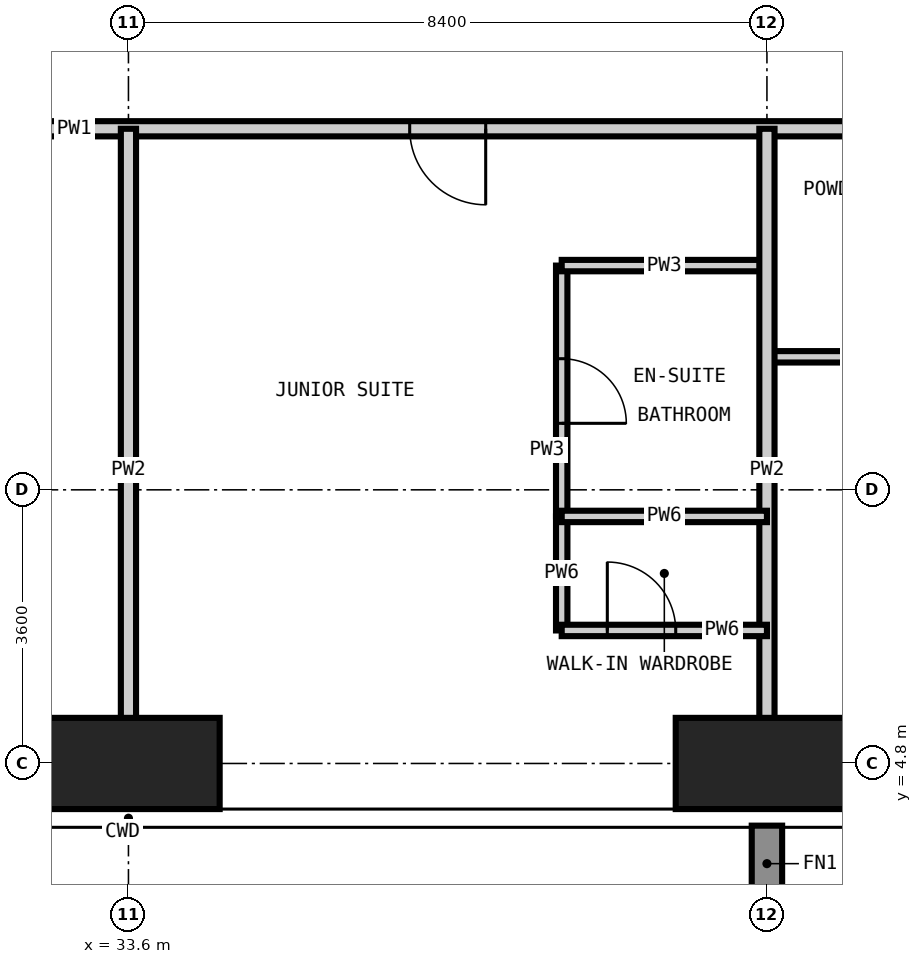
"""IFC4 building model, lengths in metres.
Left out: names, types, materials, properties, quantities, classifications, styles, units other than length and angle.
Written with IfcOpenShell. Run it as: python <this file> out.ifc"""

import sys

from ifc_helpers import new_model, si_unit, direction, frame, frame_2d, origin, origin_2d, place, context, subcontext, project, spatial, rectangle, extrude, element, fill, save


model = new_model("IFC4")
c1 = context("Model", 3, precision=1e-05, world=origin(), true_north=direction((0.0, 1.0)))
c2 = subcontext(c1, "Body", "Model", "MODEL_VIEW")
j1 = project(units=[si_unit("LENGTHUNIT", "METRE"), si_unit("PLANEANGLEUNIT", "RADIAN")], contexts=[c1])
p1 = place(None, origin())
s1 = spatial("IfcSite", under=j1, at=p1, CompositionType="ELEMENT")
p2 = place(p1, origin())
s2 = spatial("IfcBuilding", under=s1, at=p2, CompositionType="ELEMENT")
p3 = place(p2, frame((0.0, 0.0, 229.5)))
s3 = spatial("IfcBuildingStorey", under=s2, at=p3, CompositionType="ELEMENT", Elevation=229.5)
for number, where, z_axis, x_axis in (
    (1, (33.6, 4.8, -0.35), (0.0, 0.0, 1.0), (1.0, 0.0, 0.0)),
    (2, (42.0, 4.8, -0.35), (0.0, 0.0, 1.0), (1.0, 0.0, 0.0)),
):
    element("IfcColumn", number, at=place(p3, frame(where, z_axis=z_axis, x_axis=x_axis)), inside=s3, PredefinedType="COLUMN", context=c2, shape_type="SweptSolid", body=[
        extrude(rectangle(XDim=2.4, YDim=1.2, at=origin_2d()), origin(), (0.0, 0.0, 1.0), 3.9),
    ])
p4 = place(p3, frame((39.3, 8.05, 0.0), z_axis=(0.0, 0.0, 1.0), x_axis=(0.0, 1.0, 0.0)))
e3 = element("IfcWall", 3, at=p4, inside=s3, PredefinedType="PARTITIONING", context=c2, shape_type="SweptSolid", body=[
    extrude(rectangle(XDim=3.3, YDim=0.15, at=frame_2d((1.65, 0.0))), origin(), (0.0, 0.0, 1.0), 3.55),
])
p5 = place(p4, frame((1.225, 0.0, 0.0)))
e4 = element("IfcOpeningElement", 4, at=p5, cuts=e3, PredefinedType="OPENING", context=c2, shape_type="SweptSolid", body=[
    extrude(rectangle(XDim=0.85, YDim=2.1, at=frame_2d((0.425, 1.05))), frame((0.0, 0.085, 0.0), z_axis=(0.0, -1.0, 0.0), x_axis=(1.0, 0.0, 0.0)), (0.0, 0.0, 1.0), 0.17),
])
p6 = place(p3, frame((42.0, 10.15, 0.0), z_axis=(0.0, 0.0, 1.0), x_axis=(1.0, 0.0, 0.0)))
e5 = element("IfcWall", 5, at=p6, inside=s3, PredefinedType="PARTITIONING", context=c2, shape_type="SweptSolid", body=[
    extrude(rectangle(XDim=2.45, YDim=0.15, at=frame_2d((1.225, 0.0))), origin(), (0.0, 0.0, 1.0), 3.55),
])
p7 = place(p3, frame((39.3, 11.35, 0.0), z_axis=(0.0, 0.0, 1.0), x_axis=(1.0, 0.0, 0.0)))
e6 = element("IfcWall", 6, at=p7, inside=s3, PredefinedType="PARTITIONING", context=c2, shape_type="SweptSolid", body=[
    extrude(rectangle(XDim=2.7, YDim=0.15, at=frame_2d((1.35, 0.0))), origin(), (0.0, 0.0, 1.0), 3.55),
])
p8 = place(p3, frame((44.45, 13.15, 0.0), z_axis=(0.0, 0.0, 1.0), x_axis=(-1.0, 0.0, 0.0)))
e7 = element("IfcWall", 7, at=p8, inside=s3, PredefinedType="PARTITIONING", context=c2, shape_type="SweptSolid", body=[
    extrude(rectangle(XDim=23.125, YDim=0.2, at=frame_2d((11.562, 0.0))), origin(), (0.0, 0.0, 1.0), 3.55),
])
p9 = place(p8, frame((14.55, 0.0, 0.0)))
e8 = element("IfcOpeningElement", 8, at=p9, cuts=e7, PredefinedType="OPENING", context=c2, shape_type="SweptSolid", body=[
    extrude(rectangle(XDim=1.0, YDim=2.2, at=frame_2d((0.5, 1.1))), frame((0.0, 0.11, 0.0), z_axis=(0.0, -1.0, 0.0), x_axis=(1.0, 0.0, 0.0)), (0.0, 0.0, 1.0), 0.22),
])
p10 = place(p8, frame((6.15, 0.0, 0.0)))
e9 = element("IfcOpeningElement", 9, at=p10, cuts=e7, PredefinedType="OPENING", context=c2, shape_type="SweptSolid", body=[
    extrude(rectangle(XDim=1.0, YDim=2.2, at=frame_2d((0.5, 1.1))), frame((0.0, 0.11, 0.0), z_axis=(0.0, -1.0, 0.0), x_axis=(1.0, 0.0, 0.0)), (0.0, 0.0, 1.0), 0.22),
])
for number, where, z_axis, x_axis in (
    (10, (33.6, 4.182, 0.0), (0.0, 0.0, 1.0), (0.0, 1.0, 0.0)),
    (11, (42.0, 4.182, 0.0), (0.0, 0.0, 1.0), (0.0, 1.0, 0.0)),
):
    element("IfcWall", number, at=place(p3, frame(where, z_axis=z_axis, x_axis=x_axis)), inside=s3, PredefinedType="PARTITIONING", context=c2, shape_type="SweptSolid", body=[
        extrude(rectangle(XDim=8.968, YDim=0.2, at=frame_2d((4.484, 0.0))), origin(), (0.0, 0.0, 1.0), 3.55),
    ])
p11 = place(p3, frame((39.3, 6.55, 0.0), z_axis=(0.0, 0.0, 1.0), x_axis=(0.0, 1.0, 0.0)))
e12 = element("IfcWall", 12, at=p11, inside=s3, PredefinedType="PARTITIONING", context=c2, shape_type="SweptSolid", body=[
    extrude(rectangle(XDim=1.5, YDim=0.15, at=frame_2d((0.75, 0.0))), origin(), (0.0, 0.0, 1.0), 3.55),
])
p12 = place(p3, frame((39.3, 6.55, 0.0), z_axis=(0.0, 0.0, 1.0), x_axis=(1.0, 0.0, 0.0)))
e13 = element("IfcWall", 13, at=p12, inside=s3, PredefinedType="PARTITIONING", context=c2, shape_type="SweptSolid", body=[
    extrude(rectangle(XDim=2.7, YDim=0.15, at=frame_2d((1.35, 0.0))), origin(), (0.0, 0.0, 1.0), 3.55),
])
p13 = place(p12, frame((0.6, 0.0, 0.0)))
e14 = element("IfcOpeningElement", 14, at=p13, cuts=e13, PredefinedType="OPENING", context=c2, shape_type="SweptSolid", body=[
    extrude(rectangle(XDim=0.9, YDim=2.1, at=frame_2d((0.45, 1.05))), frame((0.0, 0.085, 0.0), z_axis=(0.0, -1.0, 0.0), x_axis=(1.0, 0.0, 0.0)), (0.0, 0.0, 1.0), 0.17),
])
p14 = place(p3, frame((39.3, 8.05, 0.0), z_axis=(0.0, 0.0, 1.0), x_axis=(1.0, 0.0, 0.0)))
e15 = element("IfcWall", 15, at=p14, inside=s3, PredefinedType="PARTITIONING", context=c2, shape_type="SweptSolid", body=[
    extrude(rectangle(XDim=2.7, YDim=0.15, at=frame_2d((1.35, 0.0))), origin(), (0.0, 0.0, 1.0), 3.55),
])
p15 = place(p10, origin())
e16 = element("IfcDoor", 16, at=p15, inside=s3, OperationType="SINGLE_SWING_LEFT", PredefinedType="DOOR", context=c2, shape_type="SweptSolid", body=[
    extrude(rectangle(XDim=1.0, YDim=2.2, at=frame_2d((0.5, 1.1))), frame((0.0, 0.025, 0.0), z_axis=(0.0, -1.0, 0.0), x_axis=(1.0, 0.0, 0.0)), (0.0, 0.0, 1.0), 0.05),
])
fill(e9, e16)
p16 = place(p5, frame((0.85, 0.0, 0.0), z_axis=(0.0, 0.0, 1.0), x_axis=(-1.0, 0.0, 0.0)))
e17 = element("IfcDoor", 17, at=p16, inside=s3, OperationType="SINGLE_SWING_RIGHT", PredefinedType="DOOR", context=c2, shape_type="SweptSolid", body=[
    extrude(rectangle(XDim=0.85, YDim=2.1, at=frame_2d((0.425, 1.05))), frame((0.0, 0.025, 0.0), z_axis=(0.0, -1.0, 0.0), x_axis=(1.0, 0.0, 0.0)), (0.0, 0.0, 1.0), 0.05),
])
fill(e4, e17)
p17 = place(p13, origin())
e18 = element("IfcDoor", 18, at=p17, inside=s3, OperationType="SINGLE_SWING_LEFT", PredefinedType="DOOR", context=c2, shape_type="SweptSolid", body=[
    extrude(rectangle(XDim=0.9, YDim=2.1, at=frame_2d((0.45, 1.05))), frame((0.0, 0.025, 0.0), z_axis=(0.0, -1.0, 0.0), x_axis=(1.0, 0.0, 0.0)), (0.0, 0.0, 1.0), 0.05),
])
fill(e14, e18)
save(model, sys.argv[1])
